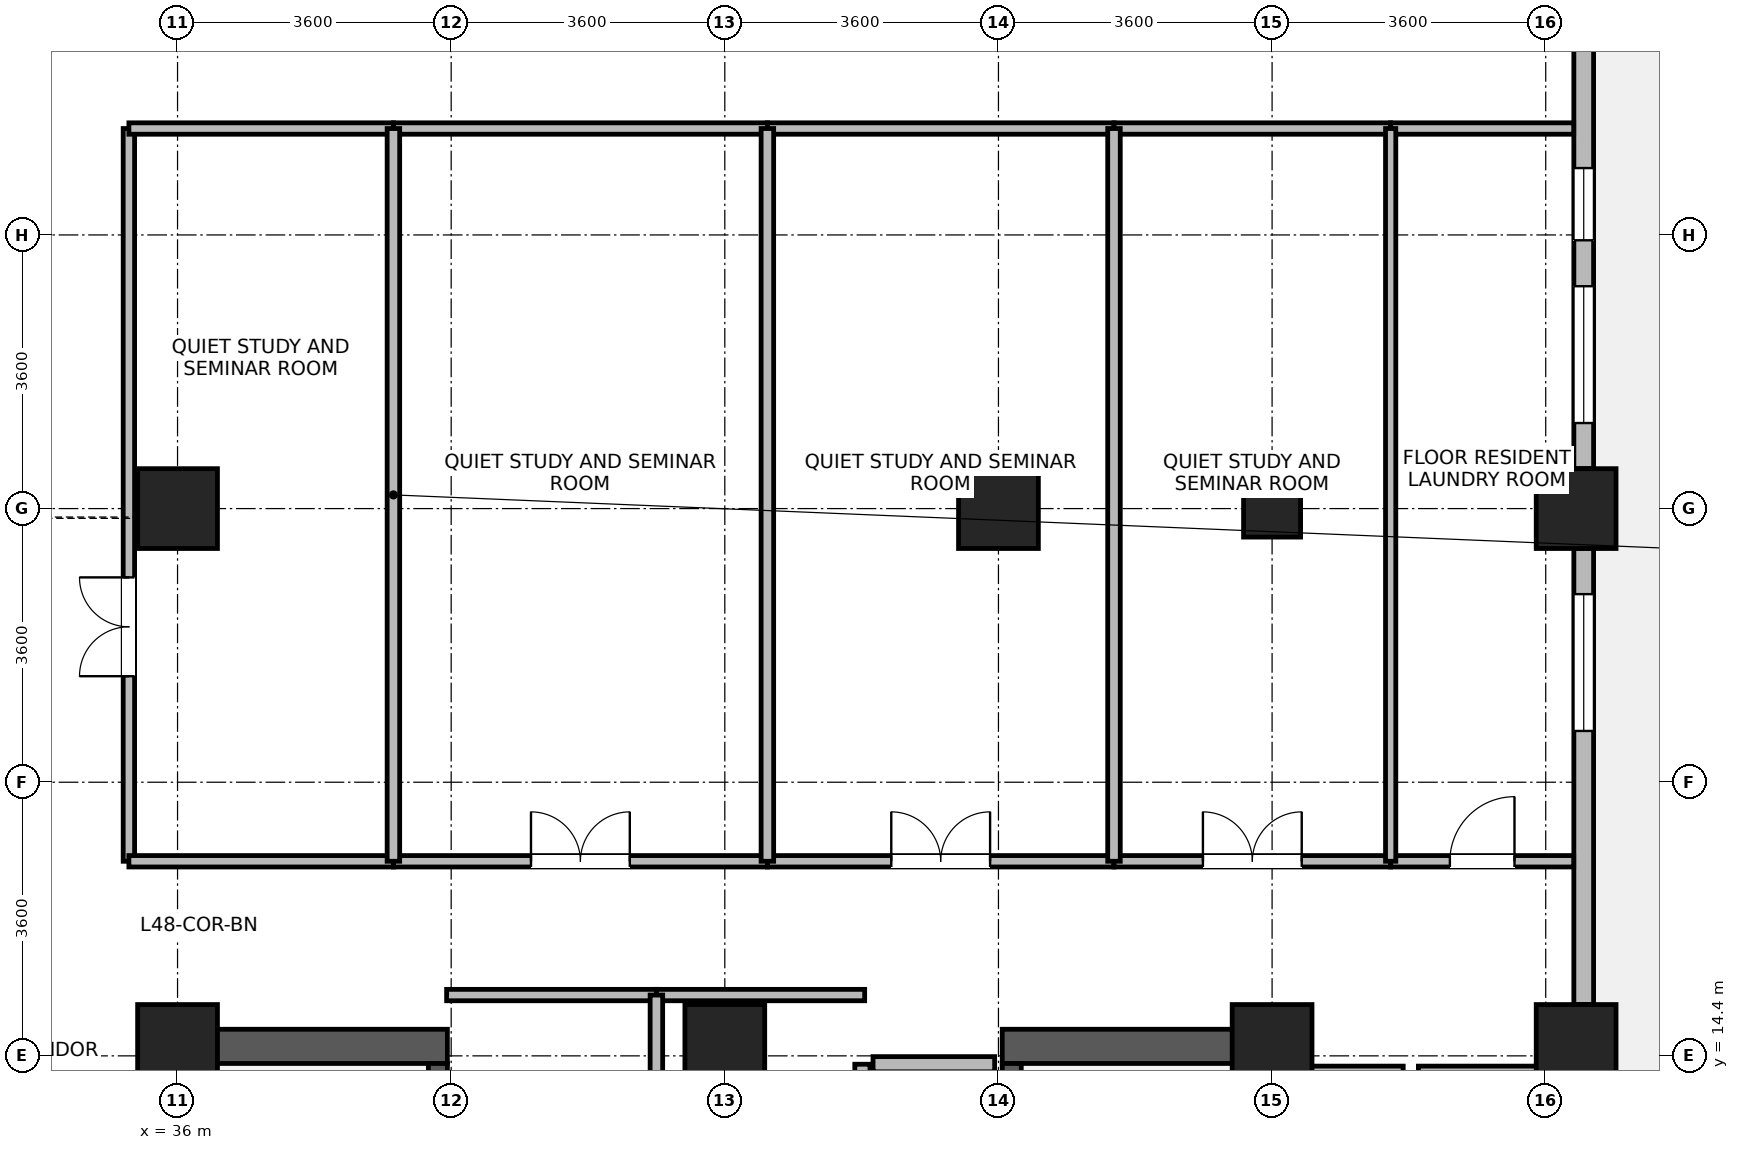
"""IFC4 building model, lengths in metres.
Left out: names, types, materials, properties, quantities, classifications, styles, units other than length and angle.
Written with IfcOpenShell. Run it as: python <this file> out.ifc"""

import sys

from ifc_helpers import new_model, si_unit, direction, frame, frame_2d, origin, origin_2d, place, context, subcontext, project, spatial, rectangle, extrude, source, transform, mapped, element, fill, save


model = new_model("IFC4")
c1 = context("Model", 3, precision=1e-05, world=origin(), true_north=direction((0.0, 1.0)))
c2 = subcontext(c1, "Body", "Model", "MODEL_VIEW")
j1 = project(units=[si_unit("LENGTHUNIT", "METRE"), si_unit("PLANEANGLEUNIT", "RADIAN")], contexts=[c1])
p1 = place(None, origin())
s1 = spatial("IfcSite", under=j1, at=p1, CompositionType="ELEMENT")
p2 = place(p1, origin())
s2 = spatial("IfcBuilding", under=s1, at=p2, CompositionType="ELEMENT")
p3 = place(p2, frame((0.0, 0.0, 188.3)))
s3 = spatial("IfcBuildingStorey", under=s2, at=p3, CompositionType="ELEMENT", Elevation=188.3)
for number, where, z_axis, x_axis in (
    (1, (36.125, 6.85, 0.0), (0.0, 0.0, 1.0), (0.0, 1.0, 0.0)),
    (2, (50.275, 6.85, 0.0), (0.0, 0.0, 1.0), (0.0, 1.0, 0.0)),
):
    element("IfcWall", number, at=place(p3, frame(where, z_axis=z_axis, x_axis=x_axis)), inside=s3, PredefinedType="SHEAR", context=c2, shape_type="SweptSolid", body=[
        extrude(rectangle(XDim=7.9, YDim=0.45, at=frame_2d((3.95, 0.0))), origin(), (0.0, 0.0, 1.0), 3.34),
    ])
for number, where, z_axis, x_axis in (
    (3, (36.35, 14.525, 0.0), (0.0, 0.0, 1.0), (1.0, 0.0, 0.0)),
    (4, (46.85, 14.525, 0.0), (0.0, 0.0, 1.0), (1.0, 0.0, 0.0)),
):
    element("IfcWall", number, at=place(p3, frame(where, z_axis=z_axis, x_axis=x_axis)), inside=s3, PredefinedType="SHEAR", context=c2, shape_type="SweptSolid", body=[
        extrude(rectangle(XDim=3.2, YDim=0.45, at=frame_2d((1.6, 0.0))), origin(), (0.0, 0.0, 1.0), 3.34),
    ])
p4 = place(p3, frame((39.425, 7.3, 0.0), z_axis=(0.0, 0.0, 1.0), x_axis=(0.0, 1.0, 0.0)))
e5 = element("IfcWall", 5, at=p4, inside=s3, PredefinedType="SHEAR", context=c2, shape_type="SweptSolid", body=[
    extrude(rectangle(XDim=7.0, YDim=0.25, at=frame_2d((3.5, 0.0))), origin(), (0.0, 0.0, 1.0), 3.34),
])
p5 = place(p4, frame((0.15, 0.0, 0.0)))
e6 = element("IfcOpeningElement", 6, at=p5, cuts=e5, PredefinedType="OPENING", context=c2, shape_type="SweptSolid", body=[
    extrude(rectangle(XDim=1.1, YDim=2.08, at=frame_2d((0.55, 1.04))), frame((0.0, 0.135, 0.0), z_axis=(0.0, -1.0, 0.0), x_axis=(1.0, 0.0, 0.0)), (0.0, 0.0, 1.0), 0.27),
])
p6 = place(p3, frame((46.975, 7.3, 0.0), z_axis=(0.0, 0.0, 1.0), x_axis=(0.0, 1.0, 0.0)))
e7 = element("IfcWall", 7, at=p6, inside=s3, PredefinedType="SHEAR", context=c2, shape_type="SweptSolid", body=[
    extrude(rectangle(XDim=7.0, YDim=0.25, at=frame_2d((3.5, 0.0))), origin(), (0.0, 0.0, 1.0), 3.34),
])
p7 = place(p6, frame((0.15, 0.0, 0.0)))
e8 = element("IfcOpeningElement", 8, at=p7, cuts=e7, PredefinedType="OPENING", context=c2, shape_type="SweptSolid", body=[
    extrude(rectangle(XDim=1.1, YDim=2.08, at=frame_2d((0.55, 1.04))), frame((0.0, 0.135, 0.0), z_axis=(0.0, -1.0, 0.0), x_axis=(1.0, 0.0, 0.0)), (0.0, 0.0, 1.0), 0.27),
])
m1 = source(origin(), c2, "Body", "SweptSolid", [
    extrude(rectangle(XDim=1.05, YDim=1.05, at=origin_2d()), origin(), (0.0, 0.0, 1.0), 3.7),
])
for number, where, z_axis, x_axis in (
    (9, (36.0, 21.6, 0.0), (0.0, 0.0, 1.0), (1.0, 0.0, 0.0)),
    (10, (46.8, 21.6, 0.0), (0.0, 0.0, 1.0), (1.0, 0.0, 0.0)),
    (11, (36.0, 14.55, 0.0), (0.0, 0.0, 1.0), (1.0, 0.0, 0.0)),
    (12, (43.2, 14.55, 0.0), (0.0, 0.0, 1.0), (1.0, 0.0, 0.0)),
    (13, (50.4, 14.55, 0.0), (0.0, 0.0, 1.0), (1.0, 0.0, 0.0)),
):
    element("IfcColumn", number, at=place(p3, frame(where, z_axis=z_axis, x_axis=x_axis)), inside=s3, PredefinedType="COLUMN", context=c2, shape_type="MappedRepresentation", body=[
        mapped(m1, transform((0.0, 0.0, 0.0), x_axis=(1.0, 0.0, 0.0), y_axis=(0.0, 1.0, 0.0), z_axis=(0.0, 0.0, 1.0), scale=1.0)),
    ])
m2 = source(origin(), c2, "Body", "SweptSolid", [
    extrude(rectangle(XDim=0.75, YDim=0.75, at=origin_2d()), origin(), (0.0, 0.0, 1.0), 3.7),
])
p8 = place(p3, frame((50.4, 21.6, 0.0), z_axis=(0.0, 0.0, 1.0), x_axis=(1.0, 0.0, 0.0)))
e14 = element("IfcColumn", 14, at=p8, inside=s3, PredefinedType="PILASTER", context=c2, shape_type="MappedRepresentation", body=[
    mapped(m2, transform((0.0, 0.0, 0.0), x_axis=(1.0, 0.0, 0.0), y_axis=(0.0, 1.0, 0.0), z_axis=(0.0, 0.0, 1.0), scale=1.0)),
])
for number, where, z_axis, x_axis in (
    (15, (54.4, 14.55, 0.0), (0.0, 0.0, 1.0), (1.0, 0.0, 0.0)),
    (16, (54.4, 21.6, 0.0), (0.0, 0.0, 1.0), (1.0, 0.0, 0.0)),
):
    element("IfcColumn", number, at=place(p3, frame(where, z_axis=z_axis, x_axis=x_axis)), inside=s3, PredefinedType="COLUMN", context=c2, shape_type="MappedRepresentation", body=[
        mapped(m1, transform((0.0, 0.0, 0.0), x_axis=(1.0, 0.0, 0.0), y_axis=(0.0, 1.0, 0.0), z_axis=(0.0, 0.0, 1.0), scale=1.0)),
    ])
p9 = place(p3, frame((54.5, 21.074, 0.0), z_axis=(0.0, 0.0, 1.0), x_axis=(0.0, -1.0, 0.0)))
e17 = element("IfcWall", 17, at=p9, inside=s3, PredefinedType="STANDARD", context=c2, shape_type="SweptSolid", body=[
    extrude(rectangle(XDim=5.998, YDim=0.26, at=frame_2d((2.999, 0.0))), origin(), (0.0, 0.0, 1.0), 2.87),
])
p10 = place(p9, frame((0.6, 0.0, 0.85)))
e18 = element("IfcOpeningElement", 18, at=p10, cuts=e17, PredefinedType="OPENING", context=c2, shape_type="SweptSolid", body=[
    extrude(rectangle(XDim=1.8, YDim=1.85, at=frame_2d((0.9, 0.925))), frame((0.0, 0.14, 0.0), z_axis=(0.0, -1.0, 0.0), x_axis=(1.0, 0.0, 0.0)), (0.0, 0.0, 1.0), 0.28),
])
p11 = place(p3, frame((54.5, 28.124, 0.0), z_axis=(0.0, 0.0, 1.0), x_axis=(0.0, -1.0, 0.0)))
e19 = element("IfcWall", 19, at=p11, inside=s3, PredefinedType="STANDARD", context=c2, shape_type="SweptSolid", body=[
    extrude(rectangle(XDim=5.998, YDim=0.26, at=frame_2d((2.999, 0.0))), origin(), (0.0, 0.0, 1.0), 2.87),
])
p12 = place(p11, frame((3.598, 0.0, 0.85)))
e20 = element("IfcOpeningElement", 20, at=p12, cuts=e19, PredefinedType="OPENING", context=c2, shape_type="SweptSolid", body=[
    extrude(rectangle(XDim=1.8, YDim=1.85, at=frame_2d((0.9, 0.925))), frame((0.0, 0.14, 0.0), z_axis=(0.0, -1.0, 0.0), x_axis=(1.0, 0.0, 0.0)), (0.0, 0.0, 1.0), 0.28),
])
p13 = place(p11, frame((2.044, 0.0, 0.85)))
e21 = element("IfcOpeningElement", 21, at=p13, cuts=e19, PredefinedType="OPENING", context=c2, shape_type="SweptSolid", body=[
    extrude(rectangle(XDim=0.95, YDim=1.75, at=frame_2d((0.475, 0.875))), frame((0.0, 0.14, 0.0), z_axis=(0.0, -1.0, 0.0), x_axis=(1.0, 0.0, 0.0)), (0.0, 0.0, 1.0), 0.28),
])
p14 = place(p3, frame((50.475, 14.165, 0.0), z_axis=(0.0, 0.0, 1.0), x_axis=(1.0, 0.0, 0.0)))
e22 = element("IfcWall", 22, at=p14, inside=s3, PredefinedType="PARTITIONING", context=c2, shape_type="SweptSolid", body=[
    extrude(rectangle(XDim=1.65, YDim=0.2, at=frame_2d((0.825, 0.0))), origin(), (0.0, 0.0, 1.0), 3.32),
])
p15 = place(p3, frame((52.325, 14.165, 0.0), z_axis=(0.0, 0.0, 1.0), x_axis=(1.0, 0.0, 0.0)))
e23 = element("IfcWall", 23, at=p15, inside=s3, PredefinedType="PARTITIONING", context=c2, shape_type="SweptSolid", body=[
    extrude(rectangle(XDim=1.65, YDim=0.2, at=frame_2d((0.825, 0.0))), origin(), (0.0, 0.0, 1.0), 3.32),
])
p16 = place(p3, frame((45.15, 14.29, 0.0), z_axis=(0.0, 0.0, 1.0), x_axis=(1.0, 0.0, 0.0)))
e24 = element("IfcWall", 24, at=p16, inside=s3, PredefinedType="PARTITIONING", context=c2, shape_type="SweptSolid", body=[
    extrude(rectangle(XDim=1.6, YDim=0.2, at=frame_2d((0.8, 0.0))), origin(), (0.0, 0.0, 1.0), 2.32),
])
p17 = place(p3, frame((45.01, 11.61, 0.0), z_axis=(0.0, 0.0, 1.0), x_axis=(0.0, 1.0, 0.0)))
e25 = element("IfcWall", 25, at=p17, inside=s3, PredefinedType="PARTITIONING", context=c2, shape_type="SweptSolid", body=[
    extrude(rectangle(XDim=2.68, YDim=0.2, at=frame_2d((1.34, 0.0))), origin(), (0.0, 0.0, 1.0), 3.32),
])
p18 = place(p3, frame((35.36, 16.96, 0.0), z_axis=(0.0, 0.0, 1.0), x_axis=(0.0, 1.0, 0.0)))
e26 = element("IfcWall", 26, at=p18, inside=s3, PredefinedType="PARTITIONING", context=c2, shape_type="SweptSolid", body=[
    extrude(rectangle(XDim=9.64, YDim=0.15, at=frame_2d((4.82, 0.0))), origin(), (0.0, 0.0, 1.0), 3.32),
])
p19 = place(p18, frame((2.435, 0.0, 0.0)))
e27 = element("IfcOpeningElement", 27, at=p19, cuts=e26, PredefinedType="OPENING", context=c2, shape_type="SweptSolid", body=[
    extrude(rectangle(XDim=1.3, YDim=2.12, at=frame_2d((0.65, 1.06))), frame((0.0, 0.085, 0.0), z_axis=(0.0, -1.0, 0.0), x_axis=(1.0, 0.0, 0.0)), (0.0, 0.0, 1.0), 0.17),
])
p20 = place(p3, frame((38.84, 16.96, 0.0), z_axis=(0.0, 0.0, 1.0), x_axis=(1.0, 0.0, 0.0)))
e28 = element("IfcWall", 28, at=p20, inside=s3, PredefinedType="PARTITIONING", context=c2, shape_type="SweptSolid", body=[
    extrude(rectangle(XDim=4.92, YDim=0.15, at=frame_2d((2.46, 0.0))), origin(), (0.0, 0.0, 1.0), 3.32),
])
p21 = place(p20, frame((1.81, 0.0, 0.0)))
e29 = element("IfcOpeningElement", 29, at=p21, cuts=e28, PredefinedType="OPENING", context=c2, shape_type="SweptSolid", body=[
    extrude(rectangle(XDim=1.3, YDim=2.12, at=frame_2d((0.65, 1.06))), frame((0.0, 0.085, 0.0), z_axis=(0.0, -1.0, 0.0), x_axis=(1.0, 0.0, 0.0)), (0.0, 0.0, 1.0), 0.17),
])
p22 = place(p3, frame((38.84, 26.6, 0.0), z_axis=(0.0, 0.0, 1.0), x_axis=(1.0, 0.0, 0.0)))
e30 = element("IfcWall", 30, at=p22, inside=s3, PredefinedType="PARTITIONING", context=c2, shape_type="SweptSolid", body=[
    extrude(rectangle(XDim=4.92, YDim=0.15, at=frame_2d((2.46, 0.0))), origin(), (0.0, 0.0, 1.0), 3.32),
])
p23 = place(p3, frame((43.76, 16.96, 0.0), z_axis=(0.0, 0.0, 1.0), x_axis=(1.0, 0.0, 0.0)))
e31 = element("IfcWall", 31, at=p23, inside=s3, PredefinedType="PARTITIONING", context=c2, shape_type="SweptSolid", body=[
    extrude(rectangle(XDim=4.56, YDim=0.15, at=frame_2d((2.28, 0.0))), origin(), (0.0, 0.0, 1.0), 3.32),
])
p24 = place(p23, frame((1.63, 0.0, 0.0)))
e32 = element("IfcOpeningElement", 32, at=p24, cuts=e31, PredefinedType="OPENING", context=c2, shape_type="SweptSolid", body=[
    extrude(rectangle(XDim=1.3, YDim=2.12, at=frame_2d((0.65, 1.06))), frame((0.0, 0.085, 0.0), z_axis=(0.0, -1.0, 0.0), x_axis=(1.0, 0.0, 0.0)), (0.0, 0.0, 1.0), 0.17),
])
p25 = place(p3, frame((43.76, 26.6, 0.0), z_axis=(0.0, 0.0, 1.0), x_axis=(1.0, 0.0, 0.0)))
e33 = element("IfcWall", 33, at=p25, inside=s3, PredefinedType="PARTITIONING", context=c2, shape_type="SweptSolid", body=[
    extrude(rectangle(XDim=4.56, YDim=0.15, at=frame_2d((2.28, 0.0))), origin(), (0.0, 0.0, 1.0), 3.32),
])
p26 = place(p3, frame((48.32, 16.96, 0.0), z_axis=(0.0, 0.0, 1.0), x_axis=(1.0, 0.0, 0.0)))
e34 = element("IfcWall", 34, at=p26, inside=s3, PredefinedType="PARTITIONING", context=c2, shape_type="SweptSolid", body=[
    extrude(rectangle(XDim=3.64, YDim=0.15, at=frame_2d((1.82, 0.0))), origin(), (0.0, 0.0, 1.0), 3.32),
])
p27 = place(p26, frame((1.17, 0.0, 0.0)))
e35 = element("IfcOpeningElement", 35, at=p27, cuts=e34, PredefinedType="OPENING", context=c2, shape_type="SweptSolid", body=[
    extrude(rectangle(XDim=1.3, YDim=2.12, at=frame_2d((0.65, 1.06))), frame((0.0, 0.085, 0.0), z_axis=(0.0, -1.0, 0.0), x_axis=(1.0, 0.0, 0.0)), (0.0, 0.0, 1.0), 0.17),
])
p28 = place(p3, frame((48.32, 26.6, 0.0), z_axis=(0.0, 0.0, 1.0), x_axis=(1.0, 0.0, 0.0)))
e36 = element("IfcWall", 36, at=p28, inside=s3, PredefinedType="PARTITIONING", context=c2, shape_type="SweptSolid", body=[
    extrude(rectangle(XDim=3.64, YDim=0.15, at=frame_2d((1.82, 0.0))), origin(), (0.0, 0.0, 1.0), 3.32),
])
for number, where, z_axis, x_axis in (
    (37, (35.36, 16.96, 0.0), (0.0, 0.0, 1.0), (1.0, 0.0, 0.0)),
    (38, (35.36, 26.6, 0.0), (0.0, 0.0, 1.0), (1.0, 0.0, 0.0)),
):
    element("IfcWall", number, at=place(p3, frame(where, z_axis=z_axis, x_axis=x_axis)), inside=s3, PredefinedType="PARTITIONING", context=c2, shape_type="SweptSolid", body=[
        extrude(rectangle(XDim=3.48, YDim=0.15, at=frame_2d((1.74, 0.0))), origin(), (0.0, 0.0, 1.0), 3.32),
    ])
p29 = place(p3, frame((39.54, 15.2, 0.0), z_axis=(0.0, 0.0, 1.0), x_axis=(1.0, 0.0, 0.0)))
e39 = element("IfcWall", 39, at=p29, inside=s3, PredefinedType="PARTITIONING", context=c2, shape_type="SweptSolid", body=[
    extrude(rectangle(XDim=2.76, YDim=0.15, at=frame_2d((1.38, 0.0))), origin(), (0.0, 0.0, 1.0), 3.32),
])
p30 = place(p3, frame((42.3, 15.2, 0.0), z_axis=(0.0, 0.0, 1.0), x_axis=(1.0, 0.0, 0.0)))
e40 = element("IfcWall", 40, at=p30, inside=s3, PredefinedType="PARTITIONING", context=c2, shape_type="SweptSolid", body=[
    extrude(rectangle(XDim=2.74, YDim=0.15, at=frame_2d((1.37, 0.0))), origin(), (0.0, 0.0, 1.0), 3.32),
])
p31 = place(p3, frame((51.96, 16.96, 0.0), z_axis=(0.0, 0.0, 1.0), x_axis=(1.0, 0.0, 0.0)))
e41 = element("IfcWall", 41, at=p31, inside=s3, PredefinedType="PARTITIONING", context=c2, shape_type="SweptSolid", body=[
    extrude(rectangle(XDim=2.408, YDim=0.15, at=frame_2d((1.204, 0.0))), origin(), (0.0, 0.0, 1.0), 3.32),
])
p32 = place(p31, frame((0.779, 0.0, 0.0)))
e42 = element("IfcOpeningElement", 42, at=p32, cuts=e41, PredefinedType="OPENING", context=c2, shape_type="SweptSolid", body=[
    extrude(rectangle(XDim=0.85, YDim=2.04, at=frame_2d((0.425, 1.02))), frame((0.0, 0.085, 0.0), z_axis=(0.0, -1.0, 0.0), x_axis=(1.0, 0.0, 0.0)), (0.0, 0.0, 1.0), 0.17),
])
p33 = place(p3, frame((51.96, 26.6, 0.0), z_axis=(0.0, 0.0, 1.0), x_axis=(1.0, 0.0, 0.0)))
e43 = element("IfcWall", 43, at=p33, inside=s3, PredefinedType="PARTITIONING", context=c2, shape_type="SweptSolid", body=[
    extrude(rectangle(XDim=2.408, YDim=0.15, at=frame_2d((1.204, 0.0))), origin(), (0.0, 0.0, 1.0), 3.32),
])
for number, where, z_axis, x_axis in (
    (44, (38.84, 16.96, 0.0), (0.0, 0.0, 1.0), (0.0, 1.0, 0.0)),
    (45, (43.76, 16.96, 0.0), (0.0, 0.0, 1.0), (0.0, 1.0, 0.0)),
    (46, (48.32, 16.96, 0.0), (0.0, 0.0, 1.0), (0.0, 1.0, 0.0)),
):
    element("IfcWall", number, at=place(p3, frame(where, z_axis=z_axis, x_axis=x_axis)), inside=s3, PredefinedType="PARTITIONING", context=c2, shape_type="SweptSolid", body=[
        extrude(rectangle(XDim=9.64, YDim=0.165, at=frame_2d((4.82, 0.0))), origin(), (0.0, 0.0, 1.0), 3.32),
    ])
p34 = place(p3, frame((51.96, 16.96, 0.0), z_axis=(0.0, 0.0, 1.0), x_axis=(0.0, 1.0, 0.0)))
e47 = element("IfcWall", 47, at=p34, inside=s3, PredefinedType="PARTITIONING", context=c2, shape_type="SweptSolid", body=[
    extrude(rectangle(XDim=9.64, YDim=0.135, at=frame_2d((4.82, 0.0))), origin(), (0.0, 0.0, 1.0), 3.32),
])
p35 = place(p3, frame((42.3, 11.64, 0.0), z_axis=(0.0, 0.0, 1.0), x_axis=(0.0, 1.0, 0.0)))
e48 = element("IfcWall", 48, at=p35, inside=s3, PredefinedType="PARTITIONING", context=c2, shape_type="SweptSolid", body=[
    extrude(rectangle(XDim=3.56, YDim=0.165, at=frame_2d((1.78, 0.0))), origin(), (0.0, 0.0, 1.0), 3.32),
])
p36 = place(p10, origin())
e49 = element("IfcWindow", 49, at=p36, inside=s3, PartitioningType="SINGLE_PANEL", PredefinedType="WINDOW", context=c2, shape_type="SweptSolid", body=[
    extrude(rectangle(XDim=1.8, YDim=1.85, at=frame_2d((0.9, 0.925))), frame((0.0, 0.03, 0.0), z_axis=(0.0, -1.0, 0.0), x_axis=(1.0, 0.0, 0.0)), (0.0, 0.0, 1.0), 0.06),
])
fill(e18, e49)
p37 = place(p12, origin())
e50 = element("IfcWindow", 50, at=p37, inside=s3, PartitioningType="SINGLE_PANEL", PredefinedType="WINDOW", context=c2, shape_type="SweptSolid", body=[
    extrude(rectangle(XDim=1.8, YDim=1.85, at=frame_2d((0.9, 0.925))), frame((0.0, 0.03, 0.0), z_axis=(0.0, -1.0, 0.0), x_axis=(1.0, 0.0, 0.0)), (0.0, 0.0, 1.0), 0.06),
])
fill(e20, e50)
p38 = place(p13, origin())
e51 = element("IfcWindow", 51, at=p38, inside=s3, PartitioningType="SINGLE_PANEL", PredefinedType="WINDOW", context=c2, shape_type="SweptSolid", body=[
    extrude(rectangle(XDim=0.95, YDim=1.75, at=frame_2d((0.475, 0.875))), frame((0.0, 0.03, 0.0), z_axis=(0.0, -1.0, 0.0), x_axis=(1.0, 0.0, 0.0)), (0.0, 0.0, 1.0), 0.06),
])
fill(e21, e51)
p39 = place(p19, origin())
e52 = element("IfcDoor", 52, at=p39, inside=s3, OperationType="DOUBLE_DOOR_SINGLE_SWING", PredefinedType="DOOR", context=c2, shape_type="SweptSolid", body=[
    extrude(rectangle(XDim=1.3, YDim=2.12, at=frame_2d((0.65, 1.06))), frame((0.0, 0.025, 0.0), z_axis=(0.0, -1.0, 0.0), x_axis=(1.0, 0.0, 0.0)), (0.0, 0.0, 1.0), 0.05),
])
fill(e27, e52)
p40 = place(p21, origin())
e53 = element("IfcDoor", 53, at=p40, inside=s3, OperationType="DOUBLE_DOOR_SINGLE_SWING", PredefinedType="DOOR", context=c2, shape_type="SweptSolid", body=[
    extrude(rectangle(XDim=1.3, YDim=2.12, at=frame_2d((0.65, 1.06))), frame((0.0, 0.025, 0.0), z_axis=(0.0, -1.0, 0.0), x_axis=(1.0, 0.0, 0.0)), (0.0, 0.0, 1.0), 0.05),
])
fill(e29, e53)
p41 = place(p24, origin())
e54 = element("IfcDoor", 54, at=p41, inside=s3, OperationType="DOUBLE_DOOR_SINGLE_SWING", PredefinedType="DOOR", context=c2, shape_type="SweptSolid", body=[
    extrude(rectangle(XDim=1.3, YDim=2.12, at=frame_2d((0.65, 1.06))), frame((0.0, 0.025, 0.0), z_axis=(0.0, -1.0, 0.0), x_axis=(1.0, 0.0, 0.0)), (0.0, 0.0, 1.0), 0.05),
])
fill(e32, e54)
p42 = place(p27, origin())
e55 = element("IfcDoor", 55, at=p42, inside=s3, OperationType="DOUBLE_DOOR_SINGLE_SWING", PredefinedType="DOOR", context=c2, shape_type="SweptSolid", body=[
    extrude(rectangle(XDim=1.3, YDim=2.12, at=frame_2d((0.65, 1.06))), frame((0.0, 0.025, 0.0), z_axis=(0.0, -1.0, 0.0), x_axis=(1.0, 0.0, 0.0)), (0.0, 0.0, 1.0), 0.05),
])
fill(e35, e55)
p43 = place(p32, origin())
e56 = element("IfcDoor", 56, at=p43, inside=s3, OperationType="SINGLE_SWING_RIGHT", PredefinedType="DOOR", context=c2, shape_type="SweptSolid", body=[
    extrude(rectangle(XDim=0.85, YDim=2.04, at=frame_2d((0.425, 1.02))), frame((0.0, 0.025, 0.0), z_axis=(0.0, -1.0, 0.0), x_axis=(1.0, 0.0, 0.0)), (0.0, 0.0, 1.0), 0.05),
])
fill(e42, e56)
save(model, sys.argv[1])
